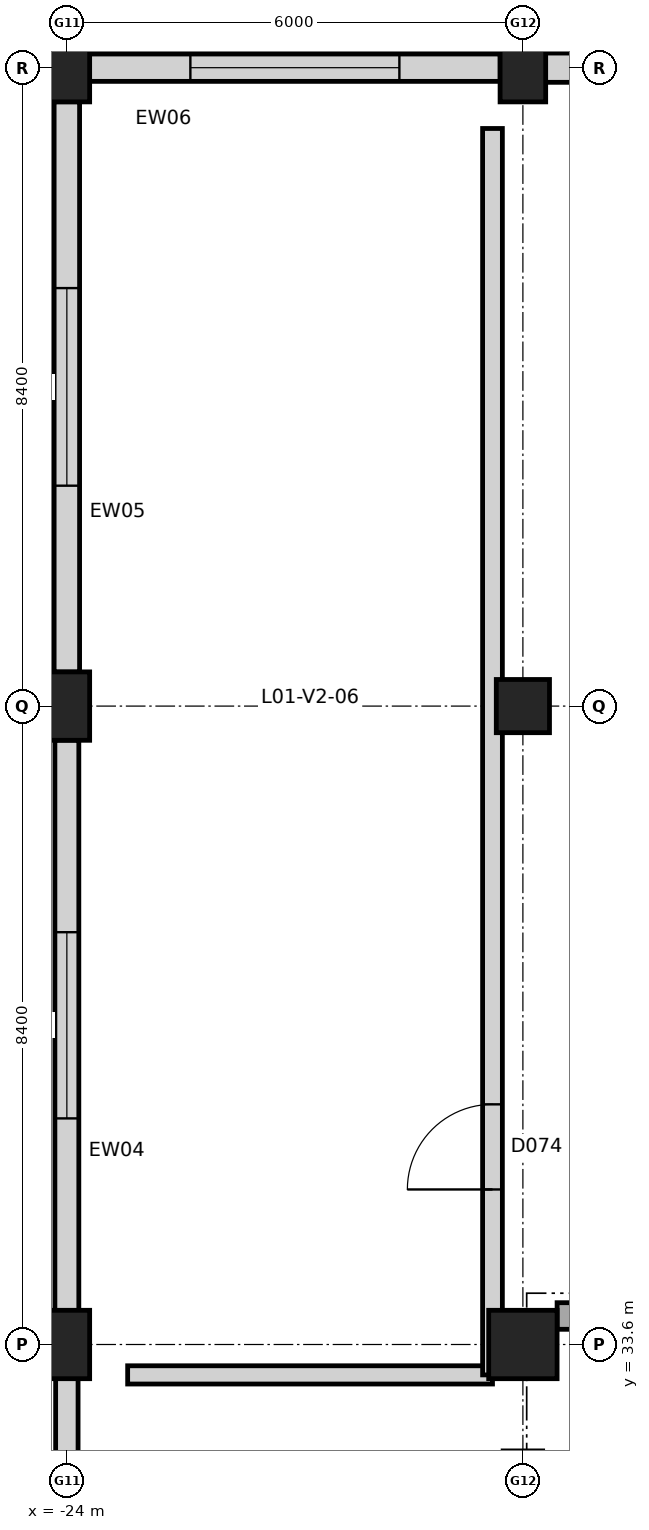
"""IFC4 building model, lengths in metres.
Left out: names, types, materials, properties, quantities, classifications, styles, units other than length and angle.
Written with IfcOpenShell. Run it as: python <this file> out.ifc"""

import sys

from ifc_helpers import new_model, si_unit, direction, frame, frame_2d, origin, origin_2d, place, context, subcontext, project, spatial, rectangle, extrude, element, fill, save


model = new_model("IFC4")
c1 = context("Model", 3, precision=1e-05, world=origin(), true_north=direction((0.0, 1.0)))
c2 = subcontext(c1, "Body", "Model", "MODEL_VIEW")
j1 = project(units=[si_unit("LENGTHUNIT", "METRE"), si_unit("PLANEANGLEUNIT", "RADIAN")], contexts=[c1])
p1 = place(None, origin())
s1 = spatial("IfcSite", under=j1, at=p1, CompositionType="ELEMENT")
p2 = place(p1, origin())
s2 = spatial("IfcBuilding", under=s1, at=p2, CompositionType="ELEMENT")
p3 = place(p2, frame((0.0, 0.0, 5.4)))
s3 = spatial("IfcBuildingStorey", under=s2, at=p3, CompositionType="ELEMENT", Elevation=5.4)
for number, where, z_axis, x_axis in (
    (1, (-24.0, 33.6, 0.0), (0.0, 0.0, 1.0), (1.0, 0.0, 0.0)),
    (2, (-24.0, 42.0, 0.0), (0.0, 0.0, 1.0), (1.0, 0.0, 0.0)),
    (3, (-24.0, 50.4, 0.0), (0.0, 0.0, 1.0), (1.0, 0.0, 0.0)),
):
    element("IfcColumn", number, at=place(p3, frame(where, z_axis=z_axis, x_axis=x_axis)), inside=s3, PredefinedType="COLUMN", context=c2, shape_type="SweptSolid", body=[
        extrude(rectangle(XDim=0.6, YDim=0.9, at=origin_2d()), origin(), (0.0, 0.0, 1.0), 4.8),
    ])
p4 = place(p3, frame((-18.0, 33.6, 0.0), z_axis=(0.0, 0.0, 1.0), x_axis=(1.0, 0.0, 0.0)))
e4 = element("IfcColumn", 4, at=p4, inside=s3, PredefinedType="COLUMN", context=c2, shape_type="SweptSolid", body=[
    extrude(rectangle(XDim=0.9, YDim=0.9, at=origin_2d()), origin(), (0.0, 0.0, 1.0), 4.8),
])
p5 = place(p3, frame((-18.0, 42.0, 0.0), z_axis=(0.0, 0.0, 1.0), x_axis=(1.0, 0.0, 0.0)))
e5 = element("IfcColumn", 5, at=p5, inside=s3, PredefinedType="COLUMN", context=c2, shape_type="SweptSolid", body=[
    extrude(rectangle(XDim=0.7, YDim=0.7, at=origin_2d()), origin(), (0.0, 0.0, 1.0), 4.8),
])
p6 = place(p3, frame((-18.0, 50.4, 0.0), z_axis=(0.0, 0.0, 1.0), x_axis=(1.0, 0.0, 0.0)))
e6 = element("IfcColumn", 6, at=p6, inside=s3, PredefinedType="COLUMN", context=c2, shape_type="SweptSolid", body=[
    extrude(rectangle(XDim=0.6, YDim=0.9, at=origin_2d()), origin(), (0.0, 0.0, 1.0), 4.8),
])
p7 = place(p3, frame((-18.0, 18.0, 0.0), z_axis=(0.0, 0.0, 1.0), x_axis=(0.0, 1.0, 0.0)))
e7 = element("IfcWall", 7, at=p7, inside=s3, PredefinedType="SHEAR", context=c2, shape_type="SweptSolid", body=[
    extrude(rectangle(XDim=14.2, YDim=0.52, at=frame_2d((7.1, 0.0))), origin(), (0.0, 0.0, 1.0), 4.8),
])
p8 = place(p3, frame((-24.0, 25.648, 0.0), z_axis=(0.0, 0.0, 1.0), x_axis=(0.0, 1.0, 0.0)))
e8 = element("IfcWall", 8, at=p8, inside=s3, PredefinedType="STANDARD", context=c2, shape_type="SweptSolid", body=[
    extrude(rectangle(XDim=7.504, YDim=0.295, at=frame_2d((3.752, 0.0))), origin(), (0.0, 0.0, 1.0), 3.829),
])
p9 = place(p8, frame((2.602, 0.0, 0.85)))
e9 = element("IfcOpeningElement", 9, at=p9, cuts=e8, PredefinedType="OPENING", context=c2, shape_type="SweptSolid", body=[
    extrude(rectangle(XDim=2.3, YDim=1.85, at=frame_2d((1.15, 0.925))), frame((0.0, 0.157, 0.0), z_axis=(0.0, -1.0, 0.0), x_axis=(1.0, 0.0, 0.0)), (0.0, 0.0, 1.0), 0.315),
])
p10 = place(p3, frame((-24.0, 34.048, 0.0), z_axis=(0.0, 0.0, 1.0), x_axis=(0.0, 1.0, 0.0)))
e10 = element("IfcWall", 10, at=p10, inside=s3, PredefinedType="STANDARD", context=c2, shape_type="SweptSolid", body=[
    extrude(rectangle(XDim=7.504, YDim=0.315, at=frame_2d((3.752, 0.0))), origin(), (0.0, 0.0, 1.0), 3.829),
])
p11 = place(p10, frame((2.527, 0.0, 0.85)))
e11 = element("IfcOpeningElement", 11, at=p11, cuts=e10, PredefinedType="OPENING", context=c2, shape_type="SweptSolid", body=[
    extrude(rectangle(XDim=2.45, YDim=1.95, at=frame_2d((1.225, 0.975))), frame((0.0, 0.167, 0.0), z_axis=(0.0, -1.0, 0.0), x_axis=(1.0, 0.0, 0.0)), (0.0, 0.0, 1.0), 0.335),
])
p12 = place(p3, frame((-24.0, 42.448, 0.0), z_axis=(0.0, 0.0, 1.0), x_axis=(0.0, 1.0, 0.0)))
e12 = element("IfcWall", 12, at=p12, inside=s3, PredefinedType="STANDARD", context=c2, shape_type="SweptSolid", body=[
    extrude(rectangle(XDim=7.504, YDim=0.335, at=frame_2d((3.752, 0.0))), origin(), (0.0, 0.0, 1.0), 3.829),
])
p13 = place(p12, frame((2.452, 0.0, 0.85)))
e13 = element("IfcOpeningElement", 13, at=p13, cuts=e12, PredefinedType="OPENING", context=c2, shape_type="SweptSolid", body=[
    extrude(rectangle(XDim=2.6, YDim=1.95, at=frame_2d((1.3, 0.975))), frame((0.0, 0.177, 0.0), z_axis=(0.0, -1.0, 0.0), x_axis=(1.0, 0.0, 0.0)), (0.0, 0.0, 1.0), 0.355),
])
p14 = place(p3, frame((-23.702, 50.4, 0.0), z_axis=(0.0, 0.0, 1.0), x_axis=(1.0, 0.0, 0.0)))
e14 = element("IfcWall", 14, at=p14, inside=s3, PredefinedType="STANDARD", context=c2, shape_type="SweptSolid", body=[
    extrude(rectangle(XDim=5.404, YDim=0.36, at=frame_2d((2.702, 0.0))), origin(), (0.0, 0.0, 1.0), 3.74),
])
p15 = place(p14, frame((1.327, 0.0, 0.85)))
e15 = element("IfcOpeningElement", 15, at=p15, cuts=e14, PredefinedType="OPENING", context=c2, shape_type="SweptSolid", body=[
    extrude(rectangle(XDim=2.75, YDim=1.95, at=frame_2d((1.375, 0.975))), frame((0.0, 0.19, 0.0), z_axis=(0.0, -1.0, 0.0), x_axis=(1.0, 0.0, 0.0)), (0.0, 0.0, 1.0), 0.38),
])
p16 = place(p3, frame((-17.702, 50.4, 0.0), z_axis=(0.0, 0.0, 1.0), x_axis=(1.0, 0.0, 0.0)))
e16 = element("IfcWall", 16, at=p16, inside=s3, PredefinedType="STANDARD", context=c2, shape_type="SweptSolid", body=[
    extrude(rectangle(XDim=5.404, YDim=0.385, at=frame_2d((2.702, 0.0))), origin(), (0.0, 0.0, 1.0), 3.74),
])
p17 = place(p16, frame((2.102, 0.0, 0.85)))
e17 = element("IfcOpeningElement", 17, at=p17, cuts=e16, PredefinedType="OPENING", context=c2, shape_type="SweptSolid", body=[
    extrude(rectangle(XDim=1.2, YDim=2.1, at=frame_2d((0.6, 1.05))), frame((0.0, 0.202, 0.0), z_axis=(0.0, -1.0, 0.0), x_axis=(1.0, 0.0, 0.0)), (0.0, 0.0, 1.0), 0.405),
])
p18 = place(p3, frame((-17.55, 33.975, 0.0), z_axis=(0.0, 0.0, 1.0), x_axis=(1.0, 0.0, 0.0)))
e18 = element("IfcWall", 18, at=p18, inside=s3, PredefinedType="SHEAR", context=c2, shape_type="SweptSolid", body=[
    extrude(rectangle(XDim=5.1, YDim=0.35, at=frame_2d((2.55, 0.0))), origin(), (0.0, 0.0, 1.0), 4.8),
])
p19 = place(p18, frame((3.07, 0.0, 0.0)))
e19 = element("IfcOpeningElement", 19, at=p19, cuts=e18, PredefinedType="OPENING", context=c2, shape_type="SweptSolid", body=[
    extrude(rectangle(XDim=1.18, YDim=2.15, at=frame_2d((0.59, 1.075))), frame((0.0, 0.185, 0.0), z_axis=(0.0, -1.0, 0.0), x_axis=(1.0, 0.0, 0.0)), (0.0, 0.0, 1.0), 0.37),
])
p20 = place(p3, frame((-23.2, 33.2, 0.0), z_axis=(0.0, 0.0, 1.0), x_axis=(1.0, 0.0, 0.0)))
e20 = element("IfcWall", 20, at=p20, inside=s3, PredefinedType="PARTITIONING", context=c2, shape_type="SweptSolid", body=[
    extrude(rectangle(XDim=4.8, YDim=0.24, at=frame_2d((2.4, 0.0))), origin(), (0.0, 0.0, 1.0), 4.42),
])
p21 = place(p3, frame((-18.4, 33.2, 0.0), z_axis=(0.0, 0.0, 1.0), x_axis=(0.0, 1.0, 0.0)))
e21 = element("IfcWall", 21, at=p21, inside=s3, PredefinedType="PARTITIONING", context=c2, shape_type="SweptSolid", body=[
    extrude(rectangle(XDim=16.4, YDim=0.26, at=frame_2d((8.2, 0.0))), origin(), (0.0, 0.0, 1.0), 3.585),
])
p22 = place(p21, frame((2.44, 0.0, 0.0)))
e22 = element("IfcOpeningElement", 22, at=p22, cuts=e21, PredefinedType="OPENING", context=c2, shape_type="SweptSolid", body=[
    extrude(rectangle(XDim=1.12, YDim=2.25, at=frame_2d((0.56, 1.125))), frame((0.0, 0.14, 0.0), z_axis=(0.0, -1.0, 0.0), x_axis=(1.0, 0.0, 0.0)), (0.0, 0.0, 1.0), 0.28),
])
p23 = place(p11, origin())
e23 = element("IfcWindow", 23, at=p23, inside=s3, PartitioningType="SINGLE_PANEL", PredefinedType="WINDOW", context=c2, shape_type="SweptSolid", body=[
    extrude(rectangle(XDim=2.45, YDim=1.95, at=frame_2d((1.225, 0.975))), frame((0.0, 0.03, 0.0), z_axis=(0.0, -1.0, 0.0), x_axis=(1.0, 0.0, 0.0)), (0.0, 0.0, 1.0), 0.06),
])
fill(e11, e23)
p24 = place(p13, origin())
e24 = element("IfcWindow", 24, at=p24, inside=s3, PartitioningType="SINGLE_PANEL", PredefinedType="WINDOW", context=c2, shape_type="SweptSolid", body=[
    extrude(rectangle(XDim=2.6, YDim=1.95, at=frame_2d((1.3, 0.975))), frame((0.0, 0.03, 0.0), z_axis=(0.0, -1.0, 0.0), x_axis=(1.0, 0.0, 0.0)), (0.0, 0.0, 1.0), 0.06),
])
fill(e13, e24)
p25 = place(p15, origin())
e25 = element("IfcWindow", 25, at=p25, inside=s3, PartitioningType="SINGLE_PANEL", PredefinedType="WINDOW", context=c2, shape_type="SweptSolid", body=[
    extrude(rectangle(XDim=2.75, YDim=1.95, at=frame_2d((1.375, 0.975))), frame((0.0, 0.03, 0.0), z_axis=(0.0, -1.0, 0.0), x_axis=(1.0, 0.0, 0.0)), (0.0, 0.0, 1.0), 0.06),
])
fill(e15, e25)
p26 = place(p22, origin())
e26 = element("IfcDoor", 26, at=p26, inside=s3, OperationType="SINGLE_SWING_LEFT", PredefinedType="DOOR", context=c2, shape_type="SweptSolid", body=[
    extrude(rectangle(XDim=1.12, YDim=2.25, at=frame_2d((0.56, 1.125))), frame((0.0, 0.025, 0.0), z_axis=(0.0, -1.0, 0.0), x_axis=(1.0, 0.0, 0.0)), (0.0, 0.0, 1.0), 0.05),
])
fill(e22, e26)
save(model, sys.argv[1])
